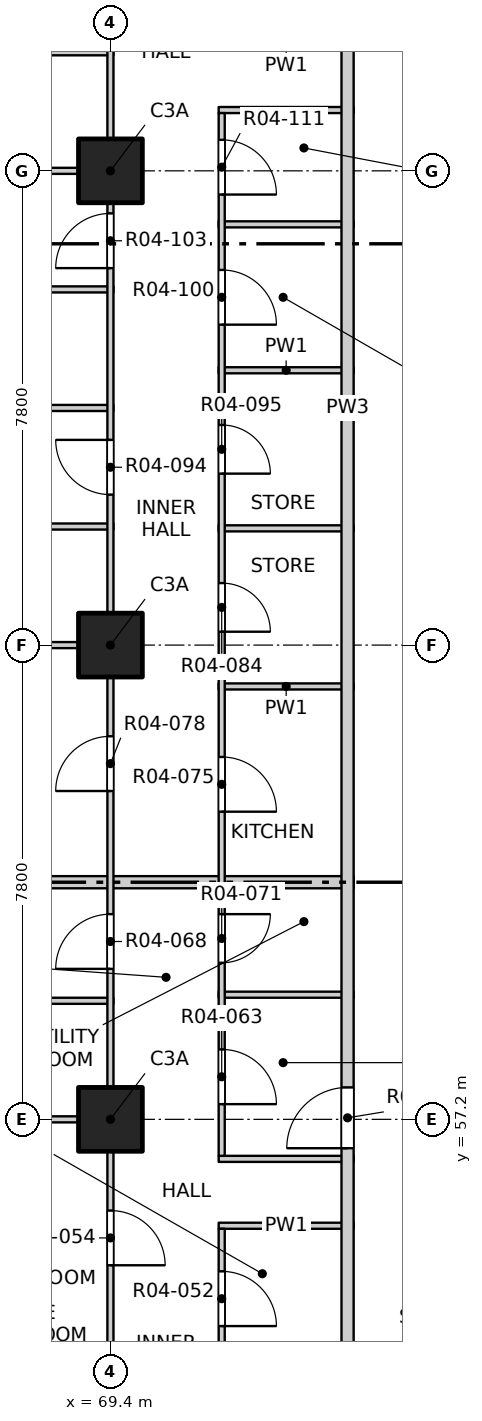
"""IFC4 building model, lengths in metres.
Left out: names, types, materials, properties, quantities, classifications, styles, units other than length and angle.
Written with IfcOpenShell. Run it as: python <this file> out.ifc"""

import sys

from ifc_helpers import new_model, si_unit, direction, frame, frame_2d, origin, origin_2d, place, context, subcontext, project, spatial, rectangle, extrude, element, fill, save


model = new_model("IFC4")
c1 = context("Model", 3, precision=1e-05, world=origin(), true_north=direction((0.0, 1.0)))
c2 = subcontext(c1, "Body", "Model", "MODEL_VIEW")
j1 = project(units=[si_unit("LENGTHUNIT", "METRE"), si_unit("PLANEANGLEUNIT", "RADIAN")], contexts=[c1])
p1 = place(None, origin())
s1 = spatial("IfcSite", under=j1, at=p1, CompositionType="ELEMENT")
p2 = place(p1, origin())
s2 = spatial("IfcBuilding", under=s1, at=p2, CompositionType="ELEMENT")
p3 = place(p2, frame((0.0, 0.0, 58.0)))
s3 = spatial("IfcBuildingStorey", under=s2, at=p3, CompositionType="ELEMENT", Elevation=58.0)
for number, where, z_axis, x_axis in (
    (1, (69.4, 57.2, -0.25), (0.0, 0.0, 1.0), (1.0, 0.0, 0.0)),
    (2, (69.4, 65.0, -0.25), (0.0, 0.0, 1.0), (1.0, 0.0, 0.0)),
    (3, (69.4, 72.8, -0.25), (0.0, 0.0, 1.0), (1.0, 0.0, 0.0)),
):
    element("IfcColumn", number, at=place(p3, frame(where, z_axis=z_axis, x_axis=x_axis)), inside=s3, PredefinedType="COLUMN", context=c2, shape_type="SweptSolid", body=[
        extrude(rectangle(XDim=1.05, YDim=1.05, at=origin_2d()), origin(), (0.0, 0.0, 1.0), 3.4),
    ])
for number, where, z_axis, x_axis in (
    (4, (71.18, 55.45, 0.0), (0.0, 0.0, 1.0), (1.0, 0.0, 0.0)),
    (5, (71.18, 56.55, 0.0), (0.0, 0.0, 1.0), (1.0, 0.0, 0.0)),
):
    element("IfcWall", number, at=place(p3, frame(where, z_axis=z_axis, x_axis=x_axis)), inside=s3, PredefinedType="PARTITIONING", context=c2, shape_type="SweptSolid", body=[
        extrude(rectangle(XDim=2.22, YDim=0.1, at=frame_2d((1.11, 0.0))), origin(), (0.0, 0.0, 1.0), 3.15),
    ])
p4 = place(p3, frame((61.9, 57.2, 0.0), z_axis=(0.0, 0.0, 1.0), x_axis=(1.0, 0.0, 0.0)))
e6 = element("IfcWall", 6, at=p4, inside=s3, PredefinedType="PARTITIONING", context=c2, shape_type="SweptSolid", body=[
    extrude(rectangle(XDim=7.55, YDim=0.1, at=frame_2d((3.775, 0.0))), origin(), (0.0, 0.0, 1.0), 2.55),
])
p5 = place(p3, frame((66.05, 59.15, 0.0), z_axis=(0.0, 0.0, 1.0), x_axis=(1.0, 0.0, 0.0)))
e7 = element("IfcWall", 7, at=p5, inside=s3, PredefinedType="PARTITIONING", context=c2, shape_type="SweptSolid", body=[
    extrude(rectangle(XDim=3.4, YDim=0.1, at=frame_2d((1.7, 0.0))), origin(), (0.0, 0.0, 1.0), 3.15),
])
p6 = place(p3, frame((71.18, 59.25, 0.0), z_axis=(0.0, 0.0, 1.0), x_axis=(1.0, 0.0, 0.0)))
e8 = element("IfcWall", 8, at=p6, inside=s3, PredefinedType="PARTITIONING", context=c2, shape_type="SweptSolid", body=[
    extrude(rectangle(XDim=2.22, YDim=0.1, at=frame_2d((1.11, 0.0))), origin(), (0.0, 0.0, 1.0), 3.15),
])
p7 = place(p3, frame((61.9, 61.1, 0.0), z_axis=(0.0, 0.0, 1.0), x_axis=(1.0, 0.0, 0.0)))
e9 = element("IfcWall", 9, at=p7, inside=s3, PredefinedType="PARTITIONING", context=c2, shape_type="SweptSolid", body=[
    extrude(rectangle(XDim=11.5, YDim=0.2, at=frame_2d((5.75, 0.0))), origin(), (0.0, 0.0, 1.0), 3.15),
])
p8 = place(p3, frame((71.18, 64.32, 0.0), z_axis=(0.0, 0.0, 1.0), x_axis=(1.0, 0.0, 0.0)))
e10 = element("IfcWall", 10, at=p8, inside=s3, PredefinedType="PARTITIONING", context=c2, shape_type="SweptSolid", body=[
    extrude(rectangle(XDim=2.22, YDim=0.1, at=frame_2d((1.11, 0.0))), origin(), (0.0, 0.0, 1.0), 3.15),
])
p9 = place(p3, frame((61.9, 65.0, 0.0), z_axis=(0.0, 0.0, 1.0), x_axis=(1.0, 0.0, 0.0)))
e11 = element("IfcWall", 11, at=p9, inside=s3, PredefinedType="PARTITIONING", context=c2, shape_type="SweptSolid", body=[
    extrude(rectangle(XDim=7.55, YDim=0.1, at=frame_2d((3.775, 0.0))), origin(), (0.0, 0.0, 1.0), 2.55),
])
p10 = place(p3, frame((71.18, 66.92, 0.0), z_axis=(0.0, 0.0, 1.0), x_axis=(1.0, 0.0, 0.0)))
e12 = element("IfcWall", 12, at=p10, inside=s3, PredefinedType="PARTITIONING", context=c2, shape_type="SweptSolid", body=[
    extrude(rectangle(XDim=2.22, YDim=0.1, at=frame_2d((1.11, 0.0))), origin(), (0.0, 0.0, 1.0), 3.15),
])
p11 = place(p3, frame((65.75, 66.95, 0.0), z_axis=(0.0, 0.0, 1.0), x_axis=(1.0, 0.0, 0.0)))
e13 = element("IfcWall", 13, at=p11, inside=s3, PredefinedType="PARTITIONING", context=c2, shape_type="SweptSolid", body=[
    extrude(rectangle(XDim=3.7, YDim=0.1, at=frame_2d((1.85, 0.0))), origin(), (0.0, 0.0, 1.0), 3.15),
])
p12 = place(p3, frame((61.9, 68.9, 0.0), z_axis=(0.0, 0.0, 1.0), x_axis=(1.0, 0.0, 0.0)))
e14 = element("IfcWall", 14, at=p12, inside=s3, PredefinedType="PARTITIONING", context=c2, shape_type="SweptSolid", body=[
    extrude(rectangle(XDim=7.55, YDim=0.1, at=frame_2d((3.775, 0.0))), origin(), (0.0, 0.0, 1.0), 3.15),
])
p13 = place(p3, frame((71.18, 69.52, 0.0), z_axis=(0.0, 0.0, 1.0), x_axis=(1.0, 0.0, 0.0)))
e15 = element("IfcWall", 15, at=p13, inside=s3, PredefinedType="PARTITIONING", context=c2, shape_type="SweptSolid", body=[
    extrude(rectangle(XDim=2.22, YDim=0.1, at=frame_2d((1.11, 0.0))), origin(), (0.0, 0.0, 1.0), 3.15),
])
p14 = place(p3, frame((65.75, 70.85, 0.0), z_axis=(0.0, 0.0, 1.0), x_axis=(1.0, 0.0, 0.0)))
e16 = element("IfcWall", 16, at=p14, inside=s3, PredefinedType="PARTITIONING", context=c2, shape_type="SweptSolid", body=[
    extrude(rectangle(XDim=3.7, YDim=0.1, at=frame_2d((1.85, 0.0))), origin(), (0.0, 0.0, 1.0), 3.15),
])
p15 = place(p3, frame((71.18, 71.92, 0.0), z_axis=(0.0, 0.0, 1.0), x_axis=(1.0, 0.0, 0.0)))
e17 = element("IfcWall", 17, at=p15, inside=s3, PredefinedType="PARTITIONING", context=c2, shape_type="SweptSolid", body=[
    extrude(rectangle(XDim=2.22, YDim=0.1, at=frame_2d((1.11, 0.0))), origin(), (0.0, 0.0, 1.0), 3.15),
])
p16 = place(p3, frame((61.9, 72.8, 0.0), z_axis=(0.0, 0.0, 1.0), x_axis=(1.0, 0.0, 0.0)))
e18 = element("IfcWall", 18, at=p16, inside=s3, PredefinedType="PARTITIONING", context=c2, shape_type="SweptSolid", body=[
    extrude(rectangle(XDim=7.55, YDim=0.1, at=frame_2d((3.775, 0.0))), origin(), (0.0, 0.0, 1.0), 2.55),
])
p17 = place(p3, frame((71.18, 73.8, 0.0), z_axis=(0.0, 0.0, 1.0), x_axis=(1.0, 0.0, 0.0)))
e19 = element("IfcWall", 19, at=p17, inside=s3, PredefinedType="PARTITIONING", context=c2, shape_type="SweptSolid", body=[
    extrude(rectangle(XDim=2.22, YDim=0.1, at=frame_2d((1.11, 0.0))), origin(), (0.0, 0.0, 1.0), 3.15),
])
p18 = place(p3, frame((65.75, 74.75, 0.0), z_axis=(0.0, 0.0, 1.0), x_axis=(1.0, 0.0, 0.0)))
e20 = element("IfcWall", 20, at=p18, inside=s3, PredefinedType="PARTITIONING", context=c2, shape_type="SweptSolid", body=[
    extrude(rectangle(XDim=3.7, YDim=0.1, at=frame_2d((1.85, 0.0))), origin(), (0.0, 0.0, 1.0), 3.15),
])
p19 = place(p3, frame((69.4, 49.4, 0.0), z_axis=(0.0, 0.0, 1.0), x_axis=(0.0, 1.0, 0.0)))
e21 = element("IfcWall", 21, at=p19, inside=s3, PredefinedType="PARTITIONING", context=c2, shape_type="SweptSolid", body=[
    extrude(rectangle(XDim=31.2, YDim=0.1, at=frame_2d((15.6, 0.0))), origin(), (0.0, 0.0, 1.0), 3.15),
])
p20 = place(p19, frame((2.475, 0.0, 0.0)))
e22 = element("IfcOpeningElement", 22, at=p20, cuts=e21, PredefinedType="OPENING", context=c2, shape_type="SweptSolid", body=[
    extrude(rectangle(XDim=0.9, YDim=2.1, at=frame_2d((0.45, 1.05))), frame((0.0, 0.06, 0.0), z_axis=(0.0, -1.0, 0.0), x_axis=(1.0, 0.0, 0.0)), (0.0, 0.0, 1.0), 0.12),
])
p21 = place(p19, frame((5.4, 0.0, 0.0)))
e23 = element("IfcOpeningElement", 23, at=p21, cuts=e21, PredefinedType="OPENING", context=c2, shape_type="SweptSolid", body=[
    extrude(rectangle(XDim=0.9, YDim=2.1, at=frame_2d((0.45, 1.05))), frame((0.0, 0.06, 0.0), z_axis=(0.0, -1.0, 0.0), x_axis=(1.0, 0.0, 0.0)), (0.0, 0.0, 1.0), 0.12),
])
p22 = place(p19, frame((10.275, 0.0, 0.0)))
e24 = element("IfcOpeningElement", 24, at=p22, cuts=e21, PredefinedType="OPENING", context=c2, shape_type="SweptSolid", body=[
    extrude(rectangle(XDim=0.9, YDim=2.1, at=frame_2d((0.45, 1.05))), frame((0.0, 0.06, 0.0), z_axis=(0.0, -1.0, 0.0), x_axis=(1.0, 0.0, 0.0)), (0.0, 0.0, 1.0), 0.12),
])
p23 = place(p19, frame((13.2, 0.0, 0.0)))
e25 = element("IfcOpeningElement", 25, at=p23, cuts=e21, PredefinedType="OPENING", context=c2, shape_type="SweptSolid", body=[
    extrude(rectangle(XDim=0.9, YDim=2.1, at=frame_2d((0.45, 1.05))), frame((0.0, 0.06, 0.0), z_axis=(0.0, -1.0, 0.0), x_axis=(1.0, 0.0, 0.0)), (0.0, 0.0, 1.0), 0.12),
])
p24 = place(p19, frame((18.075, 0.0, 0.0)))
e26 = element("IfcOpeningElement", 26, at=p24, cuts=e21, PredefinedType="OPENING", context=c2, shape_type="SweptSolid", body=[
    extrude(rectangle(XDim=0.9, YDim=2.1, at=frame_2d((0.45, 1.05))), frame((0.0, 0.06, 0.0), z_axis=(0.0, -1.0, 0.0), x_axis=(1.0, 0.0, 0.0)), (0.0, 0.0, 1.0), 0.12),
])
p25 = place(p19, frame((21.8, 0.0, 0.0)))
e27 = element("IfcOpeningElement", 27, at=p25, cuts=e21, PredefinedType="OPENING", context=c2, shape_type="SweptSolid", body=[
    extrude(rectangle(XDim=0.9, YDim=2.1, at=frame_2d((0.45, 1.05))), frame((0.0, 0.06, 0.0), z_axis=(0.0, -1.0, 0.0), x_axis=(1.0, 0.0, 0.0)), (0.0, 0.0, 1.0), 0.12),
])
p26 = place(p19, frame((25.875, 0.0, 0.0)))
e28 = element("IfcOpeningElement", 28, at=p26, cuts=e21, PredefinedType="OPENING", context=c2, shape_type="SweptSolid", body=[
    extrude(rectangle(XDim=0.9, YDim=2.1, at=frame_2d((0.45, 1.05))), frame((0.0, 0.06, 0.0), z_axis=(0.0, -1.0, 0.0), x_axis=(1.0, 0.0, 0.0)), (0.0, 0.0, 1.0), 0.12),
])
p27 = place(p19, frame((29.6, 0.0, 0.0)))
e29 = element("IfcOpeningElement", 29, at=p27, cuts=e21, PredefinedType="OPENING", context=c2, shape_type="SweptSolid", body=[
    extrude(rectangle(XDim=0.9, YDim=2.1, at=frame_2d((0.45, 1.05))), frame((0.0, 0.06, 0.0), z_axis=(0.0, -1.0, 0.0), x_axis=(1.0, 0.0, 0.0)), (0.0, 0.0, 1.0), 0.12),
])
p28 = place(p3, frame((71.23, 45.55, 0.0), z_axis=(0.0, 0.0, 1.0), x_axis=(0.0, 1.0, 0.0)))
e30 = element("IfcWall", 30, at=p28, inside=s3, PredefinedType="PARTITIONING", context=c2, shape_type="SweptSolid", body=[
    extrude(rectangle(XDim=9.85, YDim=0.1, at=frame_2d((4.925, 0.0))), origin(), (0.0, 0.0, 1.0), 3.15),
])
p29 = place(p28, frame((0.4, 0.0, 0.0)))
e31 = element("IfcOpeningElement", 31, at=p29, cuts=e30, PredefinedType="OPENING", context=c2, shape_type="SweptSolid", body=[
    extrude(rectangle(XDim=0.9, YDim=2.1, at=frame_2d((0.45, 1.05))), frame((0.0, 0.06, 0.0), z_axis=(0.0, -1.0, 0.0), x_axis=(1.0, 0.0, 0.0)), (0.0, 0.0, 1.0), 0.12),
])
p30 = place(p28, frame((2.725, 0.0, 0.0)))
e32 = element("IfcOpeningElement", 32, at=p30, cuts=e30, PredefinedType="OPENING", context=c2, shape_type="SweptSolid", body=[
    extrude(rectangle(XDim=0.8, YDim=2.1, at=frame_2d((0.4, 1.05))), frame((0.0, 0.06, 0.0), z_axis=(0.0, -1.0, 0.0), x_axis=(1.0, 0.0, 0.0)), (0.0, 0.0, 1.0), 0.12),
])
p31 = place(p28, frame((5.6, 0.0, 0.0)))
e33 = element("IfcOpeningElement", 33, at=p31, cuts=e30, PredefinedType="OPENING", context=c2, shape_type="SweptSolid", body=[
    extrude(rectangle(XDim=0.8, YDim=2.1, at=frame_2d((0.4, 1.05))), frame((0.0, 0.06, 0.0), z_axis=(0.0, -1.0, 0.0), x_axis=(1.0, 0.0, 0.0)), (0.0, 0.0, 1.0), 0.12),
])
p32 = place(p28, frame((8.25, 0.0, 0.0)))
e34 = element("IfcOpeningElement", 34, at=p32, cuts=e30, PredefinedType="OPENING", context=c2, shape_type="SweptSolid", body=[
    extrude(rectangle(XDim=0.9, YDim=2.1, at=frame_2d((0.45, 1.05))), frame((0.0, 0.06, 0.0), z_axis=(0.0, -1.0, 0.0), x_axis=(1.0, 0.0, 0.0)), (0.0, 0.0, 1.0), 0.12),
])
p33 = place(p3, frame((71.23, 56.6, 0.0), z_axis=(0.0, 0.0, 1.0), x_axis=(0.0, 1.0, 0.0)))
e35 = element("IfcWall", 35, at=p33, inside=s3, PredefinedType="PARTITIONING", context=c2, shape_type="SweptSolid", body=[
    extrude(rectangle(XDim=17.15, YDim=0.1, at=frame_2d((8.575, 0.0))), origin(), (0.0, 0.0, 1.0), 3.15),
])
p34 = place(p33, frame((0.85, 0.0, 0.0)))
e36 = element("IfcOpeningElement", 36, at=p34, cuts=e35, PredefinedType="OPENING", context=c2, shape_type="SweptSolid", body=[
    extrude(rectangle(XDim=0.9, YDim=2.1, at=frame_2d((0.45, 1.05))), frame((0.0, 0.06, 0.0), z_axis=(0.0, -1.0, 0.0), x_axis=(1.0, 0.0, 0.0)), (0.0, 0.0, 1.0), 0.12),
])
p35 = place(p33, frame((3.175, 0.0, 0.0)))
e37 = element("IfcOpeningElement", 37, at=p35, cuts=e35, PredefinedType="OPENING", context=c2, shape_type="SweptSolid", body=[
    extrude(rectangle(XDim=0.8, YDim=2.1, at=frame_2d((0.4, 1.05))), frame((0.0, 0.06, 0.0), z_axis=(0.0, -1.0, 0.0), x_axis=(1.0, 0.0, 0.0)), (0.0, 0.0, 1.0), 0.12),
])
p36 = place(p33, frame((5.66, 0.0, 0.0)))
e38 = element("IfcOpeningElement", 38, at=p36, cuts=e35, PredefinedType="OPENING", context=c2, shape_type="SweptSolid", body=[
    extrude(rectangle(XDim=0.9, YDim=2.1, at=frame_2d((0.45, 1.05))), frame((0.0, 0.06, 0.0), z_axis=(0.0, -1.0, 0.0), x_axis=(1.0, 0.0, 0.0)), (0.0, 0.0, 1.0), 0.12),
])
p37 = place(p33, frame((8.62, 0.0, 0.0)))
e39 = element("IfcOpeningElement", 39, at=p37, cuts=e35, PredefinedType="OPENING", context=c2, shape_type="SweptSolid", body=[
    extrude(rectangle(XDim=0.8, YDim=2.1, at=frame_2d((0.4, 1.05))), frame((0.0, 0.06, 0.0), z_axis=(0.0, -1.0, 0.0), x_axis=(1.0, 0.0, 0.0)), (0.0, 0.0, 1.0), 0.12),
])
p38 = place(p33, frame((11.22, 0.0, 0.0)))
e40 = element("IfcOpeningElement", 40, at=p38, cuts=e35, PredefinedType="OPENING", context=c2, shape_type="SweptSolid", body=[
    extrude(rectangle(XDim=0.8, YDim=2.1, at=frame_2d((0.4, 1.05))), frame((0.0, 0.06, 0.0), z_axis=(0.0, -1.0, 0.0), x_axis=(1.0, 0.0, 0.0)), (0.0, 0.0, 1.0), 0.12),
])
p39 = place(p33, frame((13.67, 0.0, 0.0)))
e41 = element("IfcOpeningElement", 41, at=p39, cuts=e35, PredefinedType="OPENING", context=c2, shape_type="SweptSolid", body=[
    extrude(rectangle(XDim=0.9, YDim=2.1, at=frame_2d((0.45, 1.05))), frame((0.0, 0.06, 0.0), z_axis=(0.0, -1.0, 0.0), x_axis=(1.0, 0.0, 0.0)), (0.0, 0.0, 1.0), 0.12),
])
p40 = place(p33, frame((15.81, 0.0, 0.0)))
e42 = element("IfcOpeningElement", 42, at=p40, cuts=e35, PredefinedType="OPENING", context=c2, shape_type="SweptSolid", body=[
    extrude(rectangle(XDim=0.9, YDim=2.1, at=frame_2d((0.45, 1.05))), frame((0.0, 0.06, 0.0), z_axis=(0.0, -1.0, 0.0), x_axis=(1.0, 0.0, 0.0)), (0.0, 0.0, 1.0), 0.12),
])
p41 = place(p3, frame((73.3, 53.4, 0.0), z_axis=(0.0, 0.0, 1.0), x_axis=(0.0, 1.0, 0.0)))
e43 = element("IfcWall", 43, at=p41, inside=s3, PredefinedType="PARTITIONING", context=c2, shape_type="SweptSolid", body=[
    extrude(rectangle(XDim=31.0, YDim=0.2, at=frame_2d((15.5, 0.0))), origin(), (0.0, 0.0, 1.0), 3.15),
])
p42 = place(p41, frame((3.325, 0.0, 0.0)))
e44 = element("IfcOpeningElement", 44, at=p42, cuts=e43, PredefinedType="OPENING", context=c2, shape_type="SweptSolid", body=[
    extrude(rectangle(XDim=1.0, YDim=2.1, at=frame_2d((0.5, 1.05))), frame((0.0, 0.11, 0.0), z_axis=(0.0, -1.0, 0.0), x_axis=(1.0, 0.0, 0.0)), (0.0, 0.0, 1.0), 0.22),
])
p43 = place(p41, frame((21.675, 0.0, 0.0)))
e45 = element("IfcOpeningElement", 45, at=p43, cuts=e43, PredefinedType="OPENING", context=c2, shape_type="SweptSolid", body=[
    extrude(rectangle(XDim=1.0, YDim=2.1, at=frame_2d((0.5, 1.05))), frame((0.0, 0.11, 0.0), z_axis=(0.0, -1.0, 0.0), x_axis=(1.0, 0.0, 0.0)), (0.0, 0.0, 1.0), 0.22),
])
p44 = place(p41, frame((26.225, 0.0, 0.0)))
e46 = element("IfcOpeningElement", 46, at=p44, cuts=e43, PredefinedType="OPENING", context=c2, shape_type="SweptSolid", body=[
    extrude(rectangle(XDim=1.0, YDim=2.1, at=frame_2d((0.5, 1.05))), frame((0.0, 0.11, 0.0), z_axis=(0.0, -1.0, 0.0), x_axis=(1.0, 0.0, 0.0)), (0.0, 0.0, 1.0), 0.22),
])
p45 = place(p32, origin())
e47 = element("IfcDoor", 47, at=p45, inside=s3, OperationType="SINGLE_SWING_RIGHT", PredefinedType="DOOR", context=c2, shape_type="SweptSolid", body=[
    extrude(rectangle(XDim=0.9, YDim=2.1, at=frame_2d((0.45, 1.05))), frame((0.0, 0.025, 0.0), z_axis=(0.0, -1.0, 0.0), x_axis=(1.0, 0.0, 0.0)), (0.0, 0.0, 1.0), 0.05),
])
fill(e34, e47)
p46 = place(p21, origin())
e48 = element("IfcDoor", 48, at=p46, inside=s3, OperationType="SINGLE_SWING_RIGHT", PredefinedType="DOOR", context=c2, shape_type="SweptSolid", body=[
    extrude(rectangle(XDim=0.9, YDim=2.1, at=frame_2d((0.45, 1.05))), frame((0.0, 0.025, 0.0), z_axis=(0.0, -1.0, 0.0), x_axis=(1.0, 0.0, 0.0)), (0.0, 0.0, 1.0), 0.05),
])
fill(e23, e48)
p47 = place(p42, origin())
e49 = element("IfcDoor", 49, at=p47, inside=s3, OperationType="SINGLE_SWING_RIGHT", PredefinedType="DOOR", context=c2, shape_type="SweptSolid", body=[
    extrude(rectangle(XDim=1.0, YDim=2.1, at=frame_2d((0.5, 1.05))), frame((0.0, 0.025, 0.0), z_axis=(0.0, -1.0, 0.0), x_axis=(1.0, 0.0, 0.0)), (0.0, 0.0, 1.0), 0.05),
])
fill(e44, e49)
p48 = place(p34, origin())
e50 = element("IfcDoor", 50, at=p48, inside=s3, OperationType="SINGLE_SWING_RIGHT", PredefinedType="DOOR", context=c2, shape_type="SweptSolid", body=[
    extrude(rectangle(XDim=0.9, YDim=2.1, at=frame_2d((0.45, 1.05))), frame((0.0, 0.025, 0.0), z_axis=(0.0, -1.0, 0.0), x_axis=(1.0, 0.0, 0.0)), (0.0, 0.0, 1.0), 0.05),
])
fill(e36, e50)
p49 = place(p22, origin())
e51 = element("IfcDoor", 51, at=p49, inside=s3, OperationType="SINGLE_SWING_LEFT", PredefinedType="DOOR", context=c2, shape_type="SweptSolid", body=[
    extrude(rectangle(XDim=0.9, YDim=2.1, at=frame_2d((0.45, 1.05))), frame((0.0, 0.025, 0.0), z_axis=(0.0, -1.0, 0.0), x_axis=(1.0, 0.0, 0.0)), (0.0, 0.0, 1.0), 0.05),
])
fill(e24, e51)
p50 = place(p35, origin())
e52 = element("IfcDoor", 52, at=p50, inside=s3, OperationType="SINGLE_SWING_LEFT", PredefinedType="DOOR", context=c2, shape_type="SweptSolid", body=[
    extrude(rectangle(XDim=0.8, YDim=2.1, at=frame_2d((0.4, 1.05))), frame((0.0, 0.025, 0.0), z_axis=(0.0, -1.0, 0.0), x_axis=(1.0, 0.0, 0.0)), (0.0, 0.0, 1.0), 0.05),
])
fill(e37, e52)
p51 = place(p36, origin())
e53 = element("IfcDoor", 53, at=p51, inside=s3, OperationType="SINGLE_SWING_RIGHT", PredefinedType="DOOR", context=c2, shape_type="SweptSolid", body=[
    extrude(rectangle(XDim=0.9, YDim=2.1, at=frame_2d((0.45, 1.05))), frame((0.0, 0.025, 0.0), z_axis=(0.0, -1.0, 0.0), x_axis=(1.0, 0.0, 0.0)), (0.0, 0.0, 1.0), 0.05),
])
fill(e38, e53)
p52 = place(p23, origin())
e54 = element("IfcDoor", 54, at=p52, inside=s3, OperationType="SINGLE_SWING_LEFT", PredefinedType="DOOR", context=c2, shape_type="SweptSolid", body=[
    extrude(rectangle(XDim=0.9, YDim=2.1, at=frame_2d((0.45, 1.05))), frame((0.0, 0.025, 0.0), z_axis=(0.0, -1.0, 0.0), x_axis=(1.0, 0.0, 0.0)), (0.0, 0.0, 1.0), 0.05),
])
fill(e25, e54)
p53 = place(p37, origin())
e55 = element("IfcDoor", 55, at=p53, inside=s3, OperationType="SINGLE_SWING_RIGHT", PredefinedType="DOOR", context=c2, shape_type="SweptSolid", body=[
    extrude(rectangle(XDim=0.8, YDim=2.1, at=frame_2d((0.4, 1.05))), frame((0.0, 0.025, 0.0), z_axis=(0.0, -1.0, 0.0), x_axis=(1.0, 0.0, 0.0)), (0.0, 0.0, 1.0), 0.05),
])
fill(e39, e55)
p54 = place(p24, origin())
e56 = element("IfcDoor", 56, at=p54, inside=s3, OperationType="SINGLE_SWING_RIGHT", PredefinedType="DOOR", context=c2, shape_type="SweptSolid", body=[
    extrude(rectangle(XDim=0.9, YDim=2.1, at=frame_2d((0.45, 1.05))), frame((0.0, 0.025, 0.0), z_axis=(0.0, -1.0, 0.0), x_axis=(1.0, 0.0, 0.0)), (0.0, 0.0, 1.0), 0.05),
])
fill(e26, e56)
p55 = place(p38, origin())
e57 = element("IfcDoor", 57, at=p55, inside=s3, OperationType="SINGLE_SWING_RIGHT", PredefinedType="DOOR", context=c2, shape_type="SweptSolid", body=[
    extrude(rectangle(XDim=0.8, YDim=2.1, at=frame_2d((0.4, 1.05))), frame((0.0, 0.025, 0.0), z_axis=(0.0, -1.0, 0.0), x_axis=(1.0, 0.0, 0.0)), (0.0, 0.0, 1.0), 0.05),
])
fill(e40, e57)
p56 = place(p39, origin())
e58 = element("IfcDoor", 58, at=p56, inside=s3, OperationType="SINGLE_SWING_RIGHT", PredefinedType="DOOR", context=c2, shape_type="SweptSolid", body=[
    extrude(rectangle(XDim=0.9, YDim=2.1, at=frame_2d((0.45, 1.05))), frame((0.0, 0.025, 0.0), z_axis=(0.0, -1.0, 0.0), x_axis=(1.0, 0.0, 0.0)), (0.0, 0.0, 1.0), 0.05),
])
fill(e41, e58)
p57 = place(p25, origin())
e59 = element("IfcDoor", 59, at=p57, inside=s3, OperationType="SINGLE_SWING_LEFT", PredefinedType="DOOR", context=c2, shape_type="SweptSolid", body=[
    extrude(rectangle(XDim=0.9, YDim=2.1, at=frame_2d((0.45, 1.05))), frame((0.0, 0.025, 0.0), z_axis=(0.0, -1.0, 0.0), x_axis=(1.0, 0.0, 0.0)), (0.0, 0.0, 1.0), 0.05),
])
fill(e27, e59)
p58 = place(p40, origin())
e60 = element("IfcDoor", 60, at=p58, inside=s3, OperationType="SINGLE_SWING_RIGHT", PredefinedType="DOOR", context=c2, shape_type="SweptSolid", body=[
    extrude(rectangle(XDim=0.9, YDim=2.1, at=frame_2d((0.45, 1.05))), frame((0.0, 0.025, 0.0), z_axis=(0.0, -1.0, 0.0), x_axis=(1.0, 0.0, 0.0)), (0.0, 0.0, 1.0), 0.05),
])
fill(e42, e60)
save(model, sys.argv[1])
